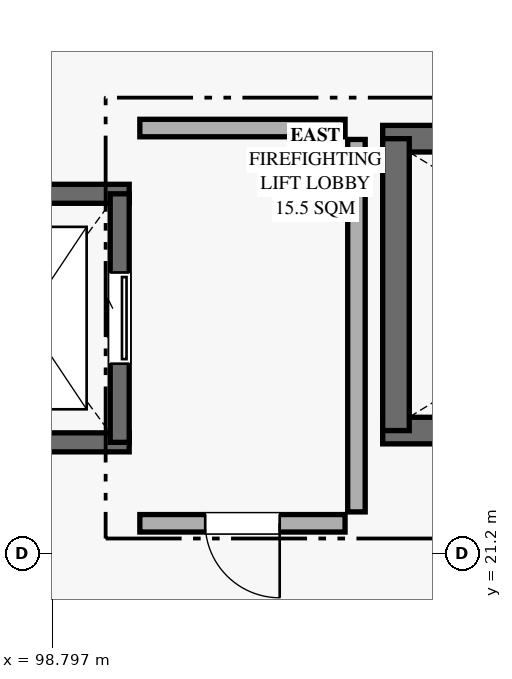
"""IFC4 building model, lengths in metres.
Left out: names, types, materials, properties, quantities, classifications, styles, units other than length and angle.
Written with IfcOpenShell. Run it as: python <this file> out.ifc"""

import sys

from ifc_helpers import new_model, si_unit, direction, frame, frame_2d, origin, place, context, subcontext, project, spatial, rectangle, extrude, element, fill, save


model = new_model("IFC4")
c1 = context("Model", 3, precision=1e-05, world=origin(), true_north=direction((0.0, 1.0)))
c2 = subcontext(c1, "Body", "Model", "MODEL_VIEW")
j1 = project(units=[si_unit("LENGTHUNIT", "METRE"), si_unit("PLANEANGLEUNIT", "RADIAN")], contexts=[c1])
p1 = place(None, origin())
s1 = spatial("IfcSite", under=j1, at=p1, CompositionType="ELEMENT")
p2 = place(p1, origin())
s2 = spatial("IfcBuilding", under=s1, at=p2, CompositionType="ELEMENT")
p3 = place(p2, frame((0.0, 0.0, 37.62)))
s3 = spatial("IfcBuildingStorey", under=s2, at=p3, CompositionType="ELEMENT", Elevation=37.62)
for number, where, z_axis, x_axis in (
    (1, (111.155, 22.82, 0.0), (0.0, 0.0, 1.0), (-1.0, 0.0, 0.0)),
    (2, (103.145, 26.66, 0.0), (0.0, 0.0, 1.0), (1.0, 0.0, 0.0)),
):
    element("IfcWall", number, at=place(p3, frame(where, z_axis=z_axis, x_axis=x_axis)), inside=s3, PredefinedType="SHEAR", context=c2, shape_type="SweptSolid", body=[
        extrude(rectangle(XDim=8.01, YDim=0.35, at=frame_2d((4.005, 0.0))), origin(), (0.0, 0.0, 1.0), 4.05),
    ])
p4 = place(p3, frame((103.32, 22.82, 0.0), z_axis=(0.0, 0.0, 1.0), x_axis=(0.0, 1.0, 0.0)))
e3 = element("IfcWall", 3, at=p4, inside=s3, PredefinedType="SHEAR", context=c2, shape_type="SweptSolid", body=[
    extrude(rectangle(XDim=3.84, YDim=0.35, at=frame_2d((1.92, 0.0))), origin(), (0.0, 0.0, 1.0), 4.05),
])
for number, where, z_axis, x_axis in (
    (4, (99.81, 22.665, 0.0), (0.0, 0.0, 1.0), (-1.0, 0.0, 0.0)),
    (5, (97.09, 25.935, 0.0), (0.0, 0.0, 1.0), (1.0, 0.0, 0.0)),
):
    element("IfcWall", number, at=place(p3, frame(where, z_axis=z_axis, x_axis=x_axis)), inside=s3, PredefinedType="SHEAR", context=c2, shape_type="SweptSolid", body=[
        extrude(rectangle(XDim=2.72, YDim=0.25, at=frame_2d((1.36, 0.0))), origin(), (0.0, 0.0, 1.0), 4.05),
    ])
p5 = place(p3, frame((99.685, 25.935, 0.0), z_axis=(0.0, 0.0, 1.0), x_axis=(0.0, -1.0, 0.0)))
e6 = element("IfcWall", 6, at=p5, inside=s3, PredefinedType="SHEAR", context=c2, shape_type="SweptSolid", body=[
    extrude(rectangle(XDim=3.27, YDim=0.25, at=frame_2d((1.635, 0.0))), origin(), (0.0, 0.0, 1.0), 4.05),
])
p6 = place(p5, frame((1.035, 0.0, 0.0)))
e7 = element("IfcOpeningElement", 7, at=p6, cuts=e6, PredefinedType="OPENING", context=c2, shape_type="SweptSolid", body=[
    extrude(rectangle(XDim=1.2, YDim=2.25, at=frame_2d((0.6, 1.125))), frame((0.0, 0.135, 0.0), z_axis=(0.0, -1.0, 0.0), x_axis=(1.0, 0.0, 0.0)), (0.0, 0.0, 1.0), 0.27),
])
p7 = place(p3, frame((102.65, 21.6, 0.0), z_axis=(0.0, 0.0, 1.0), x_axis=(-1.0, 0.0, 0.0)))
e8 = element("IfcWall", 8, at=p7, inside=s3, PredefinedType="PARTITIONING", context=c2, shape_type="SweptSolid", body=[
    extrude(rectangle(XDim=2.7, YDim=0.23, at=frame_2d((1.35, 0.0))), origin(), (0.0, 0.0, 1.0), 2.8),
])
p8 = place(p7, frame((0.86, 0.0, 0.0)))
e9 = element("IfcOpeningElement", 9, at=p8, cuts=e8, PredefinedType="OPENING", context=c2, shape_type="SweptSolid", body=[
    extrude(rectangle(XDim=0.98, YDim=2.18, at=frame_2d((0.49, 1.09))), frame((0.0, 0.125, 0.0), z_axis=(0.0, -1.0, 0.0), x_axis=(1.0, 0.0, 0.0)), (0.0, 0.0, 1.0), 0.25),
])
p9 = place(p3, frame((99.95, 26.8, 0.0), z_axis=(0.0, 0.0, 1.0), x_axis=(1.0, 0.0, 0.0)))
e10 = element("IfcWall", 10, at=p9, inside=s3, PredefinedType="PARTITIONING", context=c2, shape_type="SweptSolid", body=[
    extrude(rectangle(XDim=2.7, YDim=0.23, at=frame_2d((1.35, 0.0))), origin(), (0.0, 0.0, 1.0), 2.8),
])
p10 = place(p3, frame((102.8, 26.65, 0.0), z_axis=(0.0, 0.0, 1.0), x_axis=(0.0, -1.0, 0.0)))
e11 = element("IfcWall", 11, at=p10, inside=s3, PredefinedType="PARTITIONING", context=c2, shape_type="SweptSolid", body=[
    extrude(rectangle(XDim=4.9, YDim=0.23, at=frame_2d((2.45, 0.0))), origin(), (0.0, 0.0, 1.0), 2.8),
])
p11 = place(p6, origin())
e12 = element("IfcDoor", 12, at=p11, inside=s3, OperationType="SLIDING_TO_LEFT", PredefinedType="DOOR", context=c2, shape_type="SweptSolid", body=[
    extrude(rectangle(XDim=1.2, YDim=2.25, at=frame_2d((0.6, 1.125))), frame((0.0, 0.025, 0.0), z_axis=(0.0, -1.0, 0.0), x_axis=(1.0, 0.0, 0.0)), (0.0, 0.0, 1.0), 0.05),
])
fill(e7, e12)
p12 = place(p8, origin())
e13 = element("IfcDoor", 13, at=p12, inside=s3, OperationType="SINGLE_SWING_LEFT", PredefinedType="DOOR", context=c2, shape_type="SweptSolid", body=[
    extrude(rectangle(XDim=0.98, YDim=2.18, at=frame_2d((0.49, 1.09))), frame((0.0, 0.025, 0.0), z_axis=(0.0, -1.0, 0.0), x_axis=(1.0, 0.0, 0.0)), (0.0, 0.0, 1.0), 0.05),
])
fill(e9, e13)
save(model, sys.argv[1])
